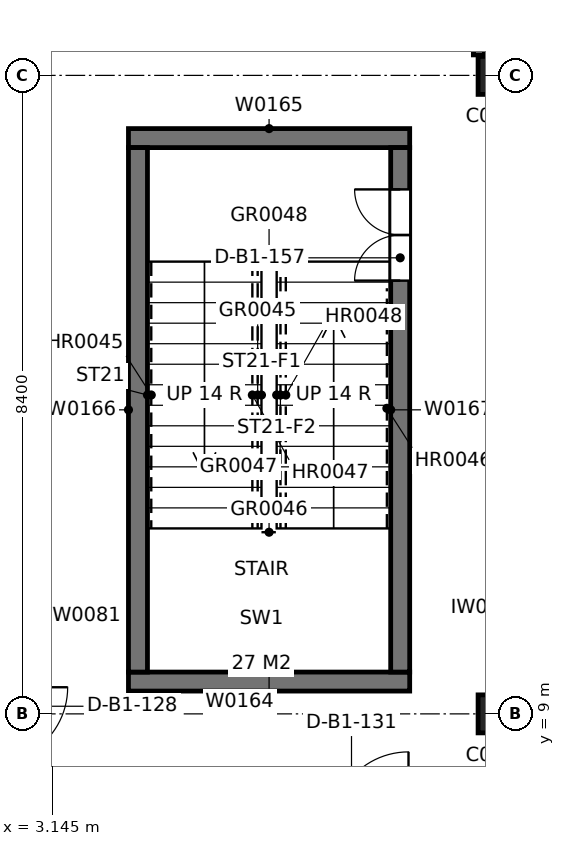
"""IFC4 building model, lengths in metres.
Left out: names, types, materials, properties, quantities, classifications, styles, units other than length and angle.
Written with IfcOpenShell. Run it as: python <this file> out.ifc"""

import sys

from ifc_helpers import new_model, si_unit, direction, frame, frame_2d, origin, origin_2d, place, context, subcontext, project, spatial, rectangle, extrude, element, fill, save


model = new_model("IFC4")
c1 = context("Model", 3, precision=1e-05, world=origin(), true_north=direction((0.0, 1.0)))
c2 = subcontext(c1, "Body", "Model", "MODEL_VIEW")
j1 = project(units=[si_unit("LENGTHUNIT", "METRE"), si_unit("PLANEANGLEUNIT", "RADIAN")], contexts=[c1])
p1 = place(None, origin())
s1 = spatial("IfcSite", under=j1, at=p1, CompositionType="ELEMENT")
p2 = place(p1, origin())
s2 = spatial("IfcBuilding", under=s1, at=p2, CompositionType="ELEMENT")
p3 = place(p2, frame((0.0, 0.0, -5.0)))
s3 = spatial("IfcBuildingStorey", under=s2, at=p3, CompositionType="ELEMENT", Elevation=-5.0)
for number, where, z_axis, x_axis in (
    (1, (9.0, 9.0, -0.5), (0.0, 0.0, 1.0), (1.0, 0.0, 0.0)),
    (2, (9.0, 17.4, -0.5), (0.0, 0.0, 1.0), (1.0, 0.0, 0.0)),
):
    element("IfcColumn", number, at=place(p3, frame(where, z_axis=z_axis, x_axis=x_axis)), inside=s3, PredefinedType="COLUMN", context=c2, shape_type="SweptSolid", body=[
        extrude(rectangle(XDim=0.5, YDim=0.5, at=origin_2d()), origin(), (0.0, 0.0, 1.0), 5.5),
    ])
for number, where, z_axis, x_axis in (
    (3, (4.15, 9.425, 0.0), (0.0, 0.0, 1.0), (1.0, 0.0, 0.0)),
    (4, (4.15, 16.575, 0.0), (0.0, 0.0, 1.0), (1.0, 0.0, 0.0)),
):
    element("IfcWall", number, at=place(p3, frame(where, z_axis=z_axis, x_axis=x_axis)), inside=s3, PredefinedType="SOLIDWALL", context=c2, shape_type="SweptSolid", body=[
        extrude(rectangle(XDim=3.7, YDim=0.25, at=frame_2d((1.85, 0.0))), origin(), (0.0, 0.0, 1.0), 5.0),
    ])
p4 = place(p3, frame((4.275, 9.55, 0.0), z_axis=(0.0, 0.0, 1.0), x_axis=(0.0, 1.0, 0.0)))
e5 = element("IfcWall", 5, at=p4, inside=s3, PredefinedType="SOLIDWALL", context=c2, shape_type="SweptSolid", body=[
    extrude(rectangle(XDim=6.9, YDim=0.25, at=frame_2d((3.45, 0.0))), origin(), (0.0, 0.0, 1.0), 5.0),
])
p5 = place(p3, frame((7.725, 9.55, 0.0), z_axis=(0.0, 0.0, 1.0), x_axis=(0.0, 1.0, 0.0)))
e6 = element("IfcWall", 6, at=p5, inside=s3, PredefinedType="SOLIDWALL", context=c2, shape_type="SweptSolid", body=[
    extrude(rectangle(XDim=6.9, YDim=0.25, at=frame_2d((3.45, 0.0))), origin(), (0.0, 0.0, 1.0), 5.0),
])
p6 = place(p5, frame((5.15, 0.0, 0.0)))
e7 = element("IfcOpeningElement", 7, at=p6, cuts=e6, PredefinedType="OPENING", context=c2, shape_type="SweptSolid", body=[
    extrude(rectangle(XDim=1.2, YDim=2.1, at=frame_2d((0.6, 1.05))), frame((0.0, 0.135, 0.0), z_axis=(0.0, -1.0, 0.0), x_axis=(1.0, 0.0, 0.0)), (0.0, 0.0, 1.0), 0.27),
])
p7 = place(p3, frame((8.76, 18.574, 0.0), z_axis=(0.0, 0.0, 1.0), x_axis=(0.003510645393, -0.999993837665, 0.0)))
e8 = element("IfcWall", 8, at=p7, inside=s3, PredefinedType="PARTITIONING", context=c2, shape_type="SweptSolid", body=[
    extrude(rectangle(XDim=0.904, YDim=0.15, at=frame_2d((0.452, 0.0))), origin(), (0.0, 0.0, 1.0), 4.04),
])
p8 = place(p6, origin())
e9 = element("IfcDoor", 9, at=p8, inside=s3, OperationType="DOUBLE_DOOR_SINGLE_SWING", PredefinedType="DOOR", context=c2, shape_type="SweptSolid", body=[
    extrude(rectangle(XDim=1.2, YDim=2.1, at=frame_2d((0.6, 1.05))), frame((0.0, 0.025, 0.0), z_axis=(0.0, -1.0, 0.0), x_axis=(1.0, 0.0, 0.0)), (0.0, 0.0, 1.0), 0.05),
])
fill(e7, e9)
save(model, sys.argv[1])
